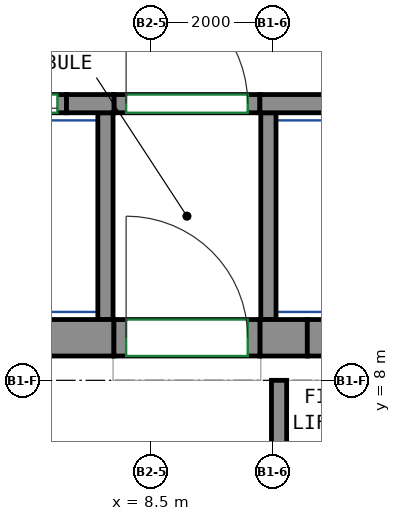
"""IFC4 building model, lengths in metres.
Left out: names, types, materials, properties, quantities, classifications, styles, units other than length and angle.
Written with IfcOpenShell. Run it as: python <this file> out.ifc"""

import sys

from ifc_helpers import new_model, si_unit, direction, frame, frame_2d, origin, place, context, subcontext, project, spatial, rectangle, extrude, source, transform, mapped, element, fill, save


model = new_model("IFC4")
c1 = context("Model", 3, precision=1e-05, world=origin(), true_north=direction((0.0, 1.0)))
c2 = subcontext(c1, "Body", "Model", "MODEL_VIEW")
j1 = project(units=[si_unit("LENGTHUNIT", "METRE"), si_unit("PLANEANGLEUNIT", "RADIAN")], contexts=[c1])
p1 = place(None, origin())
s1 = spatial("IfcSite", under=j1, at=p1, CompositionType="ELEMENT")
p2 = place(p1, origin())
s2 = spatial("IfcBuilding", under=s1, at=p2, CompositionType="ELEMENT")
p3 = place(p2, frame((0.0, 0.0, 315.4)))
s3 = spatial("IfcBuildingStorey", under=s2, at=p3, CompositionType="ELEMENT", Elevation=315.4)
m1 = source(origin(), c2, "Body", "SweptSolid", [
    extrude(rectangle(XDim=14.18, YDim=0.6, at=frame_2d((7.09, 0.0))), origin(), (0.0, 0.0, 1.0), 3.0),
])
p4 = place(p3, frame((-6.29, 8.7, 0.0), z_axis=(0.0, 0.0, 1.0), x_axis=(1.0, 0.0, 0.0)))
e1 = element("IfcWall", 1, at=p4, inside=s3, PredefinedType="SHEAR", context=c2, shape_type="MappedRepresentation", body=[
    mapped(m1, transform((0.0, 0.0, 0.0))),
])
m2 = source(origin(), c2, "Body", "SweptSolid", [
    extrude(rectangle(XDim=0.78, YDim=0.6, at=frame_2d((0.39, 0.0))), origin(), (0.0, 0.0, 1.0), 3.0),
])
p5 = place(p3, frame((10.29, 8.7, 0.0), z_axis=(0.0, 0.0, 1.0), x_axis=(1.0, 0.0, 0.0)))
e2 = element("IfcWall", 2, at=p5, inside=s3, PredefinedType="SHEAR", context=c2, shape_type="MappedRepresentation", body=[
    mapped(m2, transform((0.0, 0.0, 0.0))),
])
m3 = source(origin(), c2, "Body", "SweptSolid", [
    extrude(rectangle(XDim=0.78, YDim=0.3, at=frame_2d((0.39, 0.0))), origin(), (0.0, 0.0, 1.0), 3.0),
])
p6 = place(p3, frame((7.11, 12.55, 0.0), z_axis=(0.0, 0.0, 1.0), x_axis=(1.0, 0.0, 0.0)))
e3 = element("IfcWall", 3, at=p6, inside=s3, PredefinedType="SHEAR", context=c2, shape_type="MappedRepresentation", body=[
    mapped(m3, transform((0.0, 0.0, 0.0))),
])
m4 = source(origin(), c2, "Body", "SweptSolid", [
    extrude(rectangle(XDim=2.82, YDim=0.3, at=frame_2d((1.41, 0.0))), origin(), (0.0, 0.0, 1.0), 3.0),
])
p7 = place(p3, frame((10.29, 12.55, 0.0), z_axis=(0.0, 0.0, 1.0), x_axis=(1.0, 0.0, 0.0)))
e4 = element("IfcWall", 4, at=p7, inside=s3, PredefinedType="SHEAR", context=c2, shape_type="MappedRepresentation", body=[
    mapped(m4, transform((0.0, 0.0, 0.0))),
])
m5 = source(origin(), c2, "Body", "SweptSolid", [
    extrude(rectangle(XDim=1.4, YDim=0.3, at=frame_2d((0.7, 0.0))), origin(), (0.0, 0.0, 1.0), 3.0),
])
p8 = place(p3, frame((5.71, 12.55, 0.0), z_axis=(0.0, 0.0, 1.0), x_axis=(1.0, 0.0, 0.0)))
e5 = element("IfcWall", 5, at=p8, inside=s3, PredefinedType="PARTITIONING", context=c2, shape_type="MappedRepresentation", body=[
    mapped(m5, transform((0.0, 0.0, 0.0))),
])
p9 = place(p8, frame((0.15, 0.0, 0.0)))
e6 = element("IfcOpeningElement", 6, at=p9, cuts=e5, PredefinedType="OPENING", context=c2, shape_type="SweptSolid", body=[
    extrude(rectangle(XDim=1.1, YDim=2.1, at=frame_2d((0.55, 1.05))), frame((0.0, 0.16, 0.0), z_axis=(0.0, -1.0, 0.0), x_axis=(1.0, 0.0, 0.0)), (0.0, 0.0, 1.0), 0.32),
])
m6 = source(origin(), c2, "Body", "SweptSolid", [
    extrude(rectangle(XDim=2.4, YDim=0.3, at=frame_2d((1.2, 0.0))), origin(), (0.0, 0.0, 1.0), 3.0),
])
p10 = place(p3, frame((7.89, 12.55, 0.0), z_axis=(0.0, 0.0, 1.0), x_axis=(1.0, 0.0, 0.0)))
e7 = element("IfcWall", 7, at=p10, inside=s3, PredefinedType="PARTITIONING", context=c2, shape_type="MappedRepresentation", body=[
    mapped(m6, transform((0.0, 0.0, 0.0))),
])
p11 = place(p10, frame((0.2, 0.0, 0.0)))
e8 = element("IfcOpeningElement", 8, at=p11, cuts=e7, PredefinedType="OPENING", context=c2, shape_type="SweptSolid", body=[
    extrude(rectangle(XDim=2.0, YDim=2.1, at=frame_2d((1.0, 1.05))), frame((0.0, 0.16, 0.0), z_axis=(0.0, -1.0, 0.0), x_axis=(1.0, 0.0, 0.0)), (0.0, 0.0, 1.0), 0.32),
])
m7 = source(origin(), c2, "Body", "SweptSolid", [
    extrude(rectangle(XDim=2.65, YDim=0.25, at=frame_2d((1.325, 0.0))), origin(), (0.0, 0.0, 1.0), 3.0),
])
p12 = place(p3, frame((10.605, 5.35, 0.0), z_axis=(0.0, 0.0, 1.0), x_axis=(0.0, 1.0, 0.0)))
e9 = element("IfcWall", 9, at=p12, inside=s3, PredefinedType="PARTITIONING", context=c2, shape_type="MappedRepresentation", body=[
    mapped(m7, transform((0.0, 0.0, 0.0))),
])
m8 = source(origin(), c2, "Body", "SweptSolid", [
    extrude(rectangle(XDim=3.4, YDim=0.25, at=frame_2d((1.7, 0.0))), origin(), (0.0, 0.0, 1.0), 3.0),
])
for number, where, z_axis, x_axis in (
    (10, (10.43, 9.0, 0.0), (0.0, 0.0, 1.0), (0.0, 1.0, 0.0)),
    (11, (7.75, 9.0, 0.0), (0.0, 0.0, 1.0), (0.0, 1.0, 0.0)),
):
    element("IfcWall", number, at=place(p3, frame(where, z_axis=z_axis, x_axis=x_axis)), inside=s3, PredefinedType="PARTITIONING", context=c2, shape_type="MappedRepresentation", body=[
        mapped(m8, transform((0.0, 0.0, 0.0))),
    ])
m9 = source(origin(), c2, "Body", "SweptSolid", [
    extrude(rectangle(XDim=2.4, YDim=0.6, at=frame_2d((1.2, 0.0))), origin(), (0.0, 0.0, 1.0), 2.7),
])
p13 = place(p3, frame((7.89, 8.7, 0.0), z_axis=(0.0, 0.0, 1.0), x_axis=(1.0, 0.0, 0.0)))
e12 = element("IfcWall", 12, at=p13, inside=s3, PredefinedType="PARTITIONING", context=c2, shape_type="MappedRepresentation", body=[
    mapped(m9, transform((0.0, 0.0, 0.0))),
])
p14 = place(p13, frame((0.2, 0.0, 0.0)))
e13 = element("IfcOpeningElement", 13, at=p14, cuts=e12, PredefinedType="OPENING", context=c2, shape_type="SweptSolid", body=[
    extrude(rectangle(XDim=2.0, YDim=2.1, at=frame_2d((1.0, 1.05))), frame((0.0, 0.31, 0.0), z_axis=(0.0, -1.0, 0.0), x_axis=(1.0, 0.0, 0.0)), (0.0, 0.0, 1.0), 0.62),
])
m10 = source(origin(), c2, "Body", "SweptSolid", [
    extrude(rectangle(XDim=1.4, YDim=0.6, at=frame_2d((0.7, 0.0))), origin(), (0.0, 0.0, 1.0), 2.7),
])
p15 = place(p3, frame((11.07, 8.7, 0.0), z_axis=(0.0, 0.0, 1.0), x_axis=(1.0, 0.0, 0.0)))
e14 = element("IfcWall", 14, at=p15, inside=s3, PredefinedType="PARTITIONING", context=c2, shape_type="MappedRepresentation", body=[
    mapped(m10, transform((0.0, 0.0, 0.0))),
])
p16 = place(p15, frame((0.25, 0.0, 0.0)))
e15 = element("IfcOpeningElement", 15, at=p16, cuts=e14, PredefinedType="OPENING", context=c2, shape_type="SweptSolid", body=[
    extrude(rectangle(XDim=0.9, YDim=2.1, at=frame_2d((0.45, 1.05))), frame((0.0, 0.31, 0.0), z_axis=(0.0, -1.0, 0.0), x_axis=(1.0, 0.0, 0.0)), (0.0, 0.0, 1.0), 0.62),
])
p17 = place(p11, origin())
e16 = element("IfcDoor", 16, at=p17, inside=s3, OperationType="DOUBLE_DOOR_SINGLE_SWING", PredefinedType="DOOR", context=c2, shape_type="SweptSolid", body=[
    extrude(rectangle(XDim=2.0, YDim=2.1, at=frame_2d((1.0, 1.05))), frame((0.0, 0.025, 0.0), z_axis=(0.0, -1.0, 0.0), x_axis=(1.0, 0.0, 0.0)), (0.0, 0.0, 1.0), 0.05),
])
fill(e8, e16)
p18 = place(p14, origin())
e17 = element("IfcDoor", 17, at=p18, inside=s3, OperationType="DOUBLE_DOOR_SINGLE_SWING", PredefinedType="DOOR", context=c2, shape_type="SweptSolid", body=[
    extrude(rectangle(XDim=2.0, YDim=2.1, at=frame_2d((1.0, 1.05))), frame((0.0, 0.205, 0.0), z_axis=(0.0, -1.0, 0.0), x_axis=(1.0, 0.0, 0.0)), (0.0, 0.0, 1.0), 0.05),
])
fill(e13, e17)
p19 = place(p9, origin())
e18 = element("IfcDoor", 18, at=p19, inside=s3, OperationType="DOUBLE_DOOR_SLIDING", PredefinedType="DOOR", context=c2, shape_type="SweptSolid", body=[
    extrude(rectangle(XDim=1.1, YDim=2.1, at=frame_2d((0.55, 1.05))), frame((0.0, 0.025, 0.0), z_axis=(0.0, -1.0, 0.0), x_axis=(1.0, 0.0, 0.0)), (0.0, 0.0, 1.0), 0.05),
])
fill(e6, e18)
save(model, sys.argv[1])
